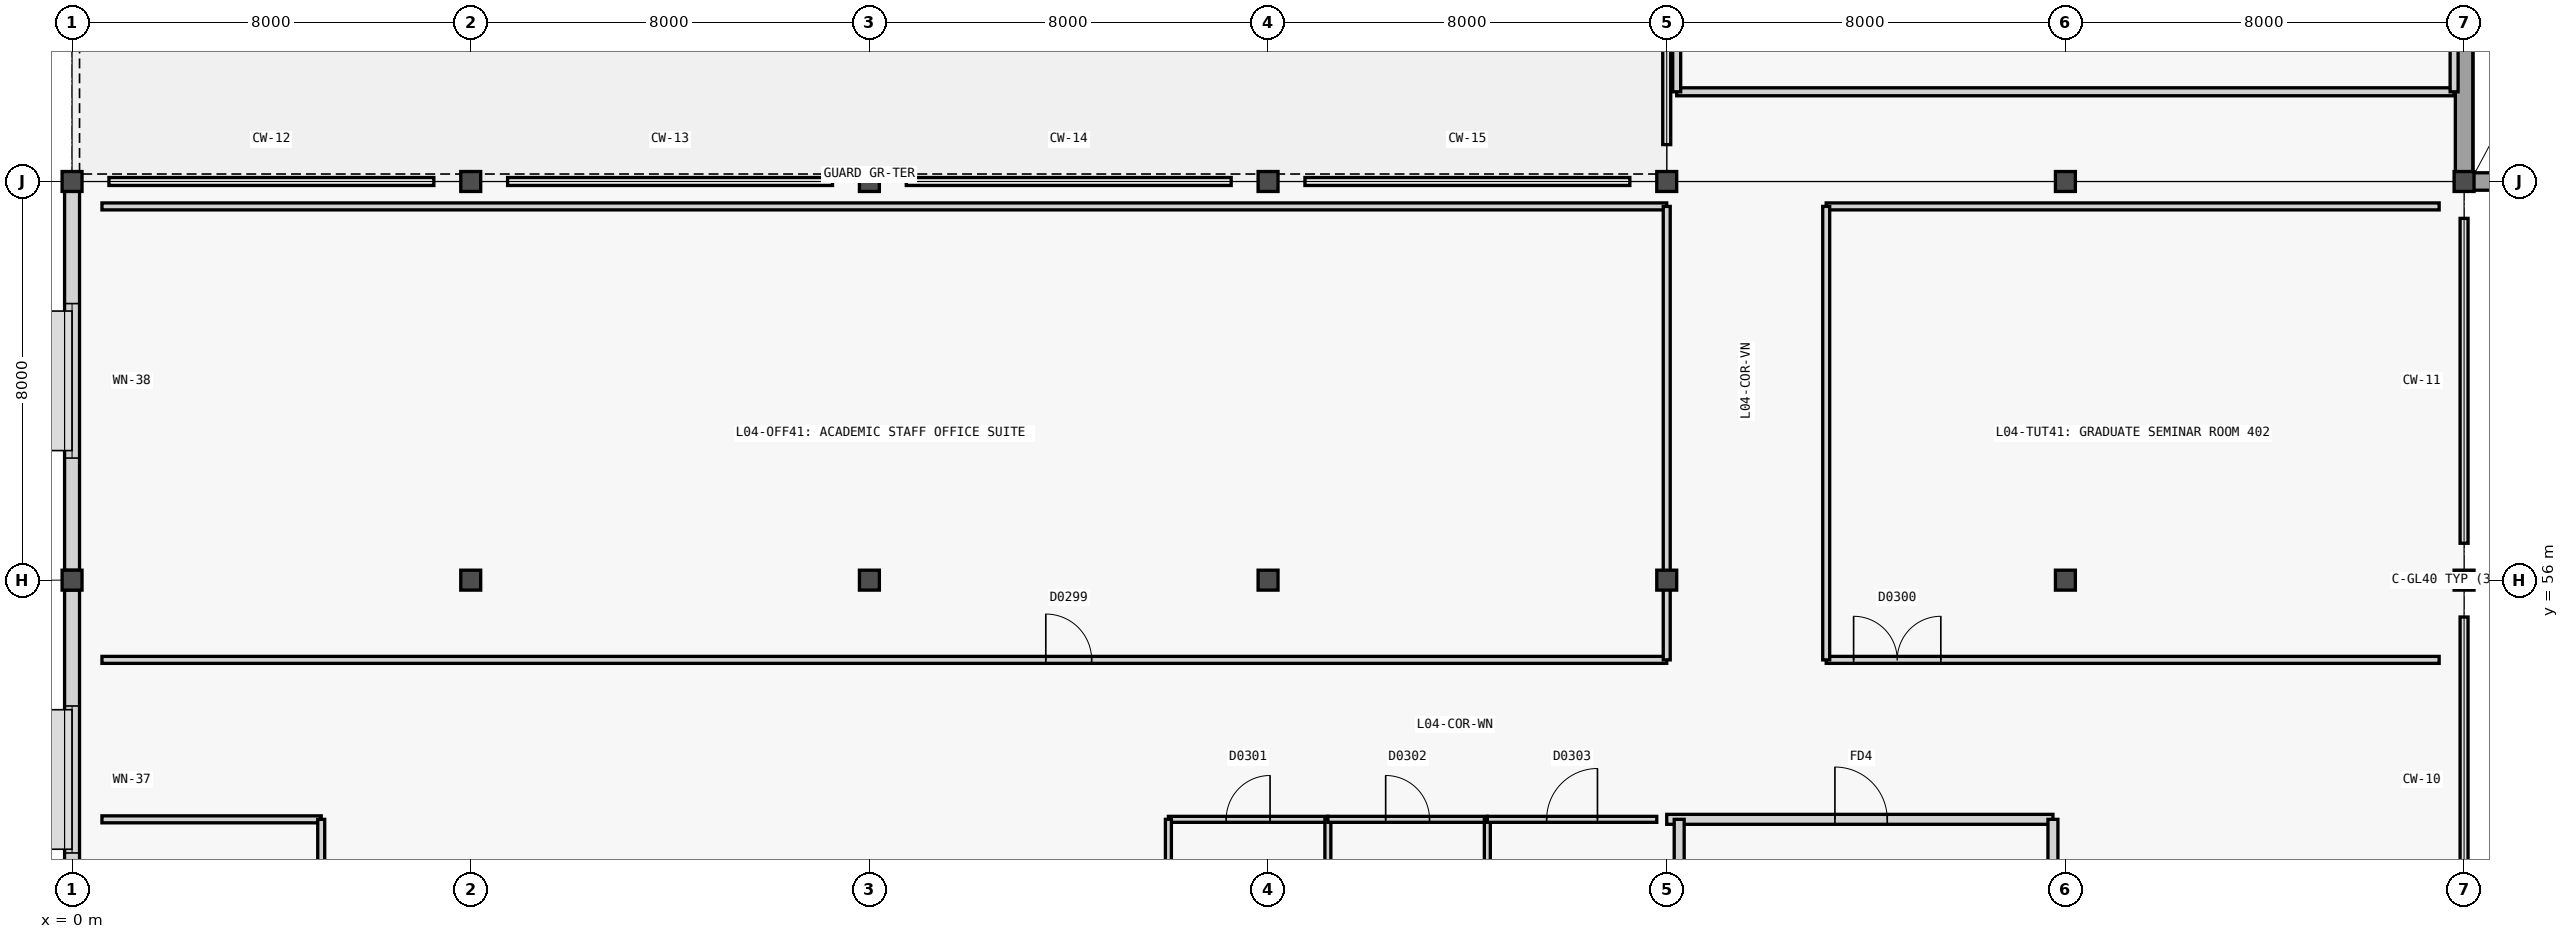
"""IFC4 building model, lengths in metres.
Left out: names, types, materials, properties, quantities, classifications, styles, units other than length and angle.
Written with IfcOpenShell. Run it as: python <this file> out.ifc"""

import sys

from ifc_helpers import new_model, si_unit, direction, frame, frame_2d, origin, origin_2d, place, context, subcontext, project, spatial, rectangle, extrude, element, fill, save


model = new_model("IFC4")
c1 = context("Model", 3, precision=1e-05, world=origin(), true_north=direction((0.0, 1.0)))
c2 = subcontext(c1, "Body", "Model", "MODEL_VIEW")
j1 = project(units=[si_unit("LENGTHUNIT", "METRE"), si_unit("PLANEANGLEUNIT", "RADIAN")], contexts=[c1])
p1 = place(None, origin())
s1 = spatial("IfcSite", under=j1, at=p1, CompositionType="ELEMENT")
p2 = place(p1, origin())
s2 = spatial("IfcBuilding", under=s1, at=p2, CompositionType="ELEMENT")
p3 = place(p2, frame((0.0, 0.0, 18.0)))
s3 = spatial("IfcBuildingStorey", under=s2, at=p3, CompositionType="ELEMENT", Elevation=18.0)
for number, where, z_axis, x_axis in (
    (1, (0.0, 56.0, 0.0), (0.0, 0.0, 1.0), (1.0, 0.0, 0.0)),
    (2, (0.0, 64.0, 0.0), (0.0, 0.0, 1.0), (1.0, 0.0, 0.0)),
    (3, (8.0, 56.0, 0.0), (0.0, 0.0, 1.0), (1.0, 0.0, 0.0)),
    (4, (8.0, 64.0, 0.0), (0.0, 0.0, 1.0), (1.0, 0.0, 0.0)),
    (5, (16.0, 56.0, 0.0), (0.0, 0.0, 1.0), (1.0, 0.0, 0.0)),
    (6, (16.0, 64.0, 0.0), (0.0, 0.0, 1.0), (1.0, 0.0, 0.0)),
    (7, (24.0, 56.0, 0.0), (0.0, 0.0, 1.0), (1.0, 0.0, 0.0)),
    (8, (24.0, 64.0, 0.0), (0.0, 0.0, 1.0), (1.0, 0.0, 0.0)),
    (9, (32.0, 56.0, 0.0), (0.0, 0.0, 1.0), (1.0, 0.0, 0.0)),
    (10, (32.0, 64.0, 0.0), (0.0, 0.0, 1.0), (1.0, 0.0, 0.0)),
    (11, (40.0, 56.0, 0.0), (0.0, 0.0, 1.0), (1.0, 0.0, 0.0)),
    (12, (40.0, 64.0, 0.0), (0.0, 0.0, 1.0), (1.0, 0.0, 0.0)),
    (13, (48.0, 56.0, 0.0), (0.0, 0.0, 1.0), (1.0, 0.0, 0.0)),
    (14, (48.0, 64.0, 0.0), (0.0, 0.0, 1.0), (1.0, 0.0, 0.0)),
):
    element("IfcColumn", number, at=place(p3, frame(where, z_axis=z_axis, x_axis=x_axis)), inside=s3, PredefinedType="COLUMN", context=c2, shape_type="SweptSolid", body=[
        extrude(rectangle(XDim=0.4, YDim=0.4, at=origin_2d()), origin(), (0.0, 0.0, 1.0), 3.6),
    ])
p4 = place(p3, frame((0.0, 48.198, 0.0), z_axis=(0.0, 0.0, 1.0), x_axis=(0.0, 1.0, 0.0)))
e15 = element("IfcWall", 15, at=p4, inside=s3, PredefinedType="SOLIDWALL", context=c2, shape_type="SweptSolid", body=[
    extrude(rectangle(XDim=7.604, YDim=0.3, at=frame_2d((3.802, 0.0))), origin(), (0.0, 0.0, 1.0), 2.78),
])
p5 = place(p4, frame((2.327, 0.0, 0.88)))
e16 = element("IfcOpeningElement", 16, at=p5, cuts=e15, PredefinedType="OPENING", context=c2, shape_type="SweptSolid", body=[
    extrude(rectangle(XDim=2.95, YDim=1.55, at=frame_2d((1.475, 0.775))), frame((0.0, 0.16, 0.0), z_axis=(0.0, -1.0, 0.0), x_axis=(1.0, 0.0, 0.0)), (0.0, 0.0, 1.0), 0.32),
])
p6 = place(p3, frame((0.0, 56.198, 0.0), z_axis=(0.0, 0.0, 1.0), x_axis=(0.0, 1.0, 0.0)))
e17 = element("IfcWall", 17, at=p6, inside=s3, PredefinedType="SOLIDWALL", context=c2, shape_type="SweptSolid", body=[
    extrude(rectangle(XDim=7.604, YDim=0.3, at=frame_2d((3.802, 0.0))), origin(), (0.0, 0.0, 1.0), 2.78),
])
p7 = place(p6, frame((2.252, 0.0, 0.88)))
e18 = element("IfcOpeningElement", 18, at=p7, cuts=e17, PredefinedType="OPENING", context=c2, shape_type="SweptSolid", body=[
    extrude(rectangle(XDim=3.1, YDim=1.6, at=frame_2d((1.55, 0.8))), frame((0.0, 0.16, 0.0), z_axis=(0.0, -1.0, 0.0), x_axis=(1.0, 0.0, 0.0)), (0.0, 0.0, 1.0), 0.32),
])
p8 = place(p3, frame((32.0, 51.2, 0.0), z_axis=(0.0, 0.0, 1.0), x_axis=(1.0, 0.0, 0.0)))
e19 = element("IfcWall", 19, at=p8, inside=s3, PredefinedType="PARTITIONING", context=c2, shape_type="SweptSolid", body=[
    extrude(rectangle(XDim=7.75, YDim=0.2, at=frame_2d((3.875, 0.0))), origin(), (0.0, 0.0, 1.0), 3.32),
])
p9 = place(p8, frame((3.375, 0.0, 0.0)))
e20 = element("IfcOpeningElement", 20, at=p9, cuts=e19, PredefinedType="OPENING", context=c2, shape_type="SweptSolid", body=[
    extrude(rectangle(XDim=1.05, YDim=2.15, at=frame_2d((0.525, 1.075))), frame((0.0, 0.11, 0.0), z_axis=(0.0, -1.0, 0.0), x_axis=(1.0, 0.0, 0.0)), (0.0, 0.0, 1.0), 0.22),
])
for number, where, z_axis, x_axis in (
    (21, (39.75, 48.0, 0.0), (0.0, 0.0, 1.0), (0.0, 1.0, 0.0)),
    (22, (32.25, 48.0, 0.0), (0.0, 0.0, 1.0), (0.0, 1.0, 0.0)),
):
    element("IfcWall", number, at=place(p3, frame(where, z_axis=z_axis, x_axis=x_axis)), inside=s3, PredefinedType="PARTITIONING", context=c2, shape_type="SweptSolid", body=[
        extrude(rectangle(XDim=3.2, YDim=0.2, at=frame_2d((1.6, 0.0))), origin(), (0.0, 0.0, 1.0), 2.78),
    ])
p10 = place(p3, frame((48.0, 64.0, 0.0), z_axis=(0.0, 0.0, 1.0), x_axis=(1.0, 0.0, 0.0)))
e23 = element("IfcWall", 23, at=p10, inside=s3, PredefinedType="SHEAR", context=c2, shape_type="SweptSolid", body=[
    extrude(rectangle(XDim=8.0, YDim=0.35, at=frame_2d((4.0, 0.0))), origin(), (0.0, 0.0, 1.0), 3.38),
])
p11 = place(p3, frame((48.0, 64.0, 0.0), z_axis=(0.0, 0.0, 1.0), x_axis=(0.0, 1.0, 0.0)))
e24 = element("IfcWall", 24, at=p11, inside=s3, PredefinedType="SHEAR", context=c2, shape_type="SweptSolid", body=[
    extrude(rectangle(XDim=8.4, YDim=0.35, at=frame_2d((4.2, 0.0))), origin(), (0.0, 0.0, 1.0), 3.38),
])
p12 = place(p3, frame((0.6, 51.2, 0.0), z_axis=(0.0, 0.0, 1.0), x_axis=(1.0, 0.0, 0.0)))
e25 = element("IfcWall", 25, at=p12, inside=s3, PredefinedType="PARTITIONING", context=c2, shape_type="SweptSolid", body=[
    extrude(rectangle(XDim=4.4, YDim=0.14, at=frame_2d((2.2, 0.0))), origin(), (0.0, 0.0, 1.0), 3.34),
])
p13 = place(p3, frame((5.0, 17.8, 0.0), z_axis=(0.0, 0.0, 1.0), x_axis=(0.0, 1.0, 0.0)))
e26 = element("IfcWall", 26, at=p13, inside=s3, PredefinedType="PARTITIONING", context=c2, shape_type="SweptSolid", body=[
    extrude(rectangle(XDim=33.4, YDim=0.14, at=frame_2d((16.7, 0.0))), origin(), (0.0, 0.0, 1.0), 3.34),
])
p14 = place(p13, frame((16.16, 0.0, 0.0)))
e27 = element("IfcOpeningElement", 27, at=p14, cuts=e26, PredefinedType="OPENING", context=c2, shape_type="SweptSolid", body=[
    extrude(rectangle(XDim=1.08, YDim=2.2, at=frame_2d((0.54, 1.1))), frame((0.0, 0.08, 0.0), z_axis=(0.0, -1.0, 0.0), x_axis=(1.0, 0.0, 0.0)), (0.0, 0.0, 1.0), 0.16),
])
p15 = place(p3, frame((0.6, 54.4, 0.0), z_axis=(0.0, 0.0, 1.0), x_axis=(1.0, 0.0, 0.0)))
e28 = element("IfcWall", 28, at=p15, inside=s3, PredefinedType="PARTITIONING", context=c2, shape_type="SweptSolid", body=[
    extrude(rectangle(XDim=31.4, YDim=0.14, at=frame_2d((15.7, 0.0))), origin(), (0.0, 0.0, 1.0), 3.34),
])
p16 = place(p15, frame((18.94, 0.0, 0.0)))
e29 = element("IfcOpeningElement", 29, at=p16, cuts=e28, PredefinedType="OPENING", context=c2, shape_type="SweptSolid", body=[
    extrude(rectangle(XDim=0.92, YDim=2.15, at=frame_2d((0.46, 1.075))), frame((0.0, 0.08, 0.0), z_axis=(0.0, -1.0, 0.0), x_axis=(1.0, 0.0, 0.0)), (0.0, 0.0, 1.0), 0.16),
])
p17 = place(p3, frame((0.6, 63.5, 0.0), z_axis=(0.0, 0.0, 1.0), x_axis=(1.0, 0.0, 0.0)))
e30 = element("IfcWall", 30, at=p17, inside=s3, PredefinedType="PARTITIONING", context=c2, shape_type="SweptSolid", body=[
    extrude(rectangle(XDim=31.4, YDim=0.14, at=frame_2d((15.7, 0.0))), origin(), (0.0, 0.0, 1.0), 3.34),
])
p18 = place(p3, frame((32.0, 54.4, 0.0), z_axis=(0.0, 0.0, 1.0), x_axis=(0.0, 1.0, 0.0)))
e31 = element("IfcWall", 31, at=p18, inside=s3, PredefinedType="PARTITIONING", context=c2, shape_type="SweptSolid", body=[
    extrude(rectangle(XDim=9.1, YDim=0.14, at=frame_2d((4.55, 0.0))), origin(), (0.0, 0.0, 1.0), 2.78),
])
p19 = place(p3, frame((35.2, 54.4, 0.0), z_axis=(0.0, 0.0, 1.0), x_axis=(1.0, 0.0, 0.0)))
e32 = element("IfcWall", 32, at=p19, inside=s3, PredefinedType="PARTITIONING", context=c2, shape_type="SweptSolid", body=[
    extrude(rectangle(XDim=12.3, YDim=0.14, at=frame_2d((6.15, 0.0))), origin(), (0.0, 0.0, 1.0), 3.34),
])
p20 = place(p19, frame((0.55, 0.0, 0.0)))
e33 = element("IfcOpeningElement", 33, at=p20, cuts=e32, PredefinedType="OPENING", context=c2, shape_type="SweptSolid", body=[
    extrude(rectangle(XDim=1.75, YDim=2.2, at=frame_2d((0.875, 1.1))), frame((0.0, 0.08, 0.0), z_axis=(0.0, -1.0, 0.0), x_axis=(1.0, 0.0, 0.0)), (0.0, 0.0, 1.0), 0.16),
])
p21 = place(p3, frame((35.2, 63.5, 0.0), z_axis=(0.0, 0.0, 1.0), x_axis=(1.0, 0.0, 0.0)))
e34 = element("IfcWall", 34, at=p21, inside=s3, PredefinedType="PARTITIONING", context=c2, shape_type="SweptSolid", body=[
    extrude(rectangle(XDim=12.3, YDim=0.14, at=frame_2d((6.15, 0.0))), origin(), (0.0, 0.0, 1.0), 3.34),
])
p22 = place(p3, frame((35.2, 54.4, 0.0), z_axis=(0.0, 0.0, 1.0), x_axis=(0.0, 1.0, 0.0)))
e35 = element("IfcWall", 35, at=p22, inside=s3, PredefinedType="PARTITIONING", context=c2, shape_type="SweptSolid", body=[
    extrude(rectangle(XDim=9.1, YDim=0.14, at=frame_2d((4.55, 0.0))), origin(), (0.0, 0.0, 1.0), 3.34),
])
p23 = place(p3, frame((22.0, 51.2, 0.0), z_axis=(0.0, 0.0, 1.0), x_axis=(1.0, 0.0, 0.0)))
e36 = element("IfcWall", 36, at=p23, inside=s3, PredefinedType="PARTITIONING", context=c2, shape_type="SweptSolid", body=[
    extrude(rectangle(XDim=3.2, YDim=0.12, at=frame_2d((1.6, 0.0))), origin(), (0.0, 0.0, 1.0), 3.34),
])
p24 = place(p23, frame((1.16, 0.0, 0.0)))
e37 = element("IfcOpeningElement", 37, at=p24, cuts=e36, PredefinedType="OPENING", context=c2, shape_type="SweptSolid", body=[
    extrude(rectangle(XDim=0.88, YDim=2.1, at=frame_2d((0.44, 1.05))), frame((0.0, 0.07, 0.0), z_axis=(0.0, -1.0, 0.0), x_axis=(1.0, 0.0, 0.0)), (0.0, 0.0, 1.0), 0.14),
])
for number, where, z_axis, x_axis in (
    (38, (22.0, 46.4, 0.0), (0.0, 0.0, 1.0), (0.0, 1.0, 0.0)),
    (39, (25.2, 46.4, 0.0), (0.0, 0.0, 1.0), (0.0, 1.0, 0.0)),
):
    element("IfcWall", number, at=place(p3, frame(where, z_axis=z_axis, x_axis=x_axis)), inside=s3, PredefinedType="PARTITIONING", context=c2, shape_type="SweptSolid", body=[
        extrude(rectangle(XDim=4.8, YDim=0.12, at=frame_2d((2.4, 0.0))), origin(), (0.0, 0.0, 1.0), 3.34),
    ])
p25 = place(p3, frame((25.2, 51.2, 0.0), z_axis=(0.0, 0.0, 1.0), x_axis=(1.0, 0.0, 0.0)))
e40 = element("IfcWall", 40, at=p25, inside=s3, PredefinedType="PARTITIONING", context=c2, shape_type="SweptSolid", body=[
    extrude(rectangle(XDim=3.2, YDim=0.12, at=frame_2d((1.6, 0.0))), origin(), (0.0, 0.0, 1.0), 3.34),
])
p26 = place(p25, frame((1.16, 0.0, 0.0)))
e41 = element("IfcOpeningElement", 41, at=p26, cuts=e40, PredefinedType="OPENING", context=c2, shape_type="SweptSolid", body=[
    extrude(rectangle(XDim=0.88, YDim=2.1, at=frame_2d((0.44, 1.05))), frame((0.0, 0.07, 0.0), z_axis=(0.0, -1.0, 0.0), x_axis=(1.0, 0.0, 0.0)), (0.0, 0.0, 1.0), 0.14),
])
p27 = place(p3, frame((28.4, 46.4, 0.0), z_axis=(0.0, 0.0, 1.0), x_axis=(0.0, 1.0, 0.0)))
e42 = element("IfcWall", 42, at=p27, inside=s3, PredefinedType="PARTITIONING", context=c2, shape_type="SweptSolid", body=[
    extrude(rectangle(XDim=4.8, YDim=0.12, at=frame_2d((2.4, 0.0))), origin(), (0.0, 0.0, 1.0), 3.34),
])
p28 = place(p3, frame((28.4, 51.2, 0.0), z_axis=(0.0, 0.0, 1.0), x_axis=(1.0, 0.0, 0.0)))
e43 = element("IfcWall", 43, at=p28, inside=s3, PredefinedType="PARTITIONING", context=c2, shape_type="SweptSolid", body=[
    extrude(rectangle(XDim=3.4, YDim=0.12, at=frame_2d((1.7, 0.0))), origin(), (0.0, 0.0, 1.0), 3.34),
])
p29 = place(p28, frame((1.19, 0.0, 0.0)))
e44 = element("IfcOpeningElement", 44, at=p29, cuts=e43, PredefinedType="OPENING", context=c2, shape_type="SweptSolid", body=[
    extrude(rectangle(XDim=1.02, YDim=2.1, at=frame_2d((0.51, 1.05))), frame((0.0, 0.07, 0.0), z_axis=(0.0, -1.0, 0.0), x_axis=(1.0, 0.0, 0.0)), (0.0, 0.0, 1.0), 0.14),
])
p30 = place(p3, frame((32.2, 65.8, 0.0), z_axis=(0.0, 0.0, 1.0), x_axis=(1.0, 0.0, 0.0)))
e45 = element("IfcWall", 45, at=p30, inside=s3, PredefinedType="PARTITIONING", context=c2, shape_type="SweptSolid", body=[
    extrude(rectangle(XDim=15.6, YDim=0.16, at=frame_2d((7.8, 0.0))), origin(), (0.0, 0.0, 1.0), 3.34),
])
p31 = place(p3, frame((32.2, 65.8, 0.0), z_axis=(0.0, 0.0, 1.0), x_axis=(0.0, 1.0, 0.0)))
e46 = element("IfcWall", 46, at=p31, inside=s3, PredefinedType="PARTITIONING", context=c2, shape_type="SweptSolid", body=[
    extrude(rectangle(XDim=17.4, YDim=0.16, at=frame_2d((8.7, 0.0))), origin(), (0.0, 0.0, 1.0), 2.76),
])
p32 = place(p3, frame((47.8, 65.8, 0.0), z_axis=(0.0, 0.0, 1.0), x_axis=(0.0, 1.0, 0.0)))
e47 = element("IfcWall", 47, at=p32, inside=s3, PredefinedType="PARTITIONING", context=c2, shape_type="SweptSolid", body=[
    extrude(rectangle(XDim=17.4, YDim=0.16, at=frame_2d((8.7, 0.0))), origin(), (0.0, 0.0, 1.0), 2.76),
])
p33 = place(p32, frame((11.15, 0.0, 0.0)))
e48 = element("IfcOpeningElement", 48, at=p33, cuts=e47, PredefinedType="OPENING", context=c2, shape_type="SweptSolid", body=[
    extrude(rectangle(XDim=1.9, YDim=2.3, at=frame_2d((0.95, 1.15))), frame((0.0, 0.09, 0.0), z_axis=(0.0, -1.0, 0.0), x_axis=(1.0, 0.0, 0.0)), (0.0, 0.0, 1.0), 0.18),
])
p34 = place(p5, origin())
e49 = element("IfcWindow", 49, at=p34, inside=s3, PartitioningType="SINGLE_PANEL", PredefinedType="WINDOW", context=c2, shape_type="SweptSolid", body=[
    extrude(rectangle(XDim=2.95, YDim=1.55, at=frame_2d((1.475, 0.775))), frame((0.0, 0.03, 0.0), z_axis=(0.0, -1.0, 0.0), x_axis=(1.0, 0.0, 0.0)), (0.0, 0.0, 1.0), 0.06),
])
fill(e16, e49)
p35 = place(p7, origin())
e50 = element("IfcWindow", 50, at=p35, inside=s3, PartitioningType="SINGLE_PANEL", PredefinedType="WINDOW", context=c2, shape_type="SweptSolid", body=[
    extrude(rectangle(XDim=3.1, YDim=1.6, at=frame_2d((1.55, 0.8))), frame((0.0, 0.03, 0.0), z_axis=(0.0, -1.0, 0.0), x_axis=(1.0, 0.0, 0.0)), (0.0, 0.0, 1.0), 0.06),
])
fill(e18, e50)
p36 = place(p9, origin())
e51 = element("IfcDoor", 51, at=p36, inside=s3, OperationType="SINGLE_SWING_LEFT", PredefinedType="DOOR", context=c2, shape_type="SweptSolid", body=[
    extrude(rectangle(XDim=1.05, YDim=2.15, at=frame_2d((0.525, 1.075))), frame((0.0, 0.025, 0.0), z_axis=(0.0, -1.0, 0.0), x_axis=(1.0, 0.0, 0.0)), (0.0, 0.0, 1.0), 0.05),
])
fill(e20, e51)
p37 = place(p16, origin())
e52 = element("IfcDoor", 52, at=p37, inside=s3, OperationType="SINGLE_SWING_LEFT", PredefinedType="DOOR", context=c2, shape_type="SweptSolid", body=[
    extrude(rectangle(XDim=0.92, YDim=2.15, at=frame_2d((0.46, 1.075))), frame((0.0, 0.025, 0.0), z_axis=(0.0, -1.0, 0.0), x_axis=(1.0, 0.0, 0.0)), (0.0, 0.0, 1.0), 0.05),
])
fill(e29, e52)
p38 = place(p20, origin())
e53 = element("IfcDoor", 53, at=p38, inside=s3, OperationType="DOUBLE_DOOR_SINGLE_SWING", PredefinedType="DOOR", context=c2, shape_type="SweptSolid", body=[
    extrude(rectangle(XDim=1.75, YDim=2.2, at=frame_2d((0.875, 1.1))), frame((0.0, 0.025, 0.0), z_axis=(0.0, -1.0, 0.0), x_axis=(1.0, 0.0, 0.0)), (0.0, 0.0, 1.0), 0.05),
])
fill(e33, e53)
p39 = place(p24, origin())
e54 = element("IfcDoor", 54, at=p39, inside=s3, OperationType="SINGLE_SWING_RIGHT", PredefinedType="DOOR", context=c2, shape_type="SweptSolid", body=[
    extrude(rectangle(XDim=0.88, YDim=2.1, at=frame_2d((0.44, 1.05))), frame((0.0, 0.025, 0.0), z_axis=(0.0, -1.0, 0.0), x_axis=(1.0, 0.0, 0.0)), (0.0, 0.0, 1.0), 0.05),
])
fill(e37, e54)
p40 = place(p26, origin())
e55 = element("IfcDoor", 55, at=p40, inside=s3, OperationType="SINGLE_SWING_LEFT", PredefinedType="DOOR", context=c2, shape_type="SweptSolid", body=[
    extrude(rectangle(XDim=0.88, YDim=2.1, at=frame_2d((0.44, 1.05))), frame((0.0, 0.025, 0.0), z_axis=(0.0, -1.0, 0.0), x_axis=(1.0, 0.0, 0.0)), (0.0, 0.0, 1.0), 0.05),
])
fill(e41, e55)
p41 = place(p29, origin())
e56 = element("IfcDoor", 56, at=p41, inside=s3, OperationType="SINGLE_SWING_RIGHT", PredefinedType="DOOR", context=c2, shape_type="SweptSolid", body=[
    extrude(rectangle(XDim=1.02, YDim=2.1, at=frame_2d((0.51, 1.05))), frame((0.0, 0.025, 0.0), z_axis=(0.0, -1.0, 0.0), x_axis=(1.0, 0.0, 0.0)), (0.0, 0.0, 1.0), 0.05),
])
fill(e44, e56)
save(model, sys.argv[1])
